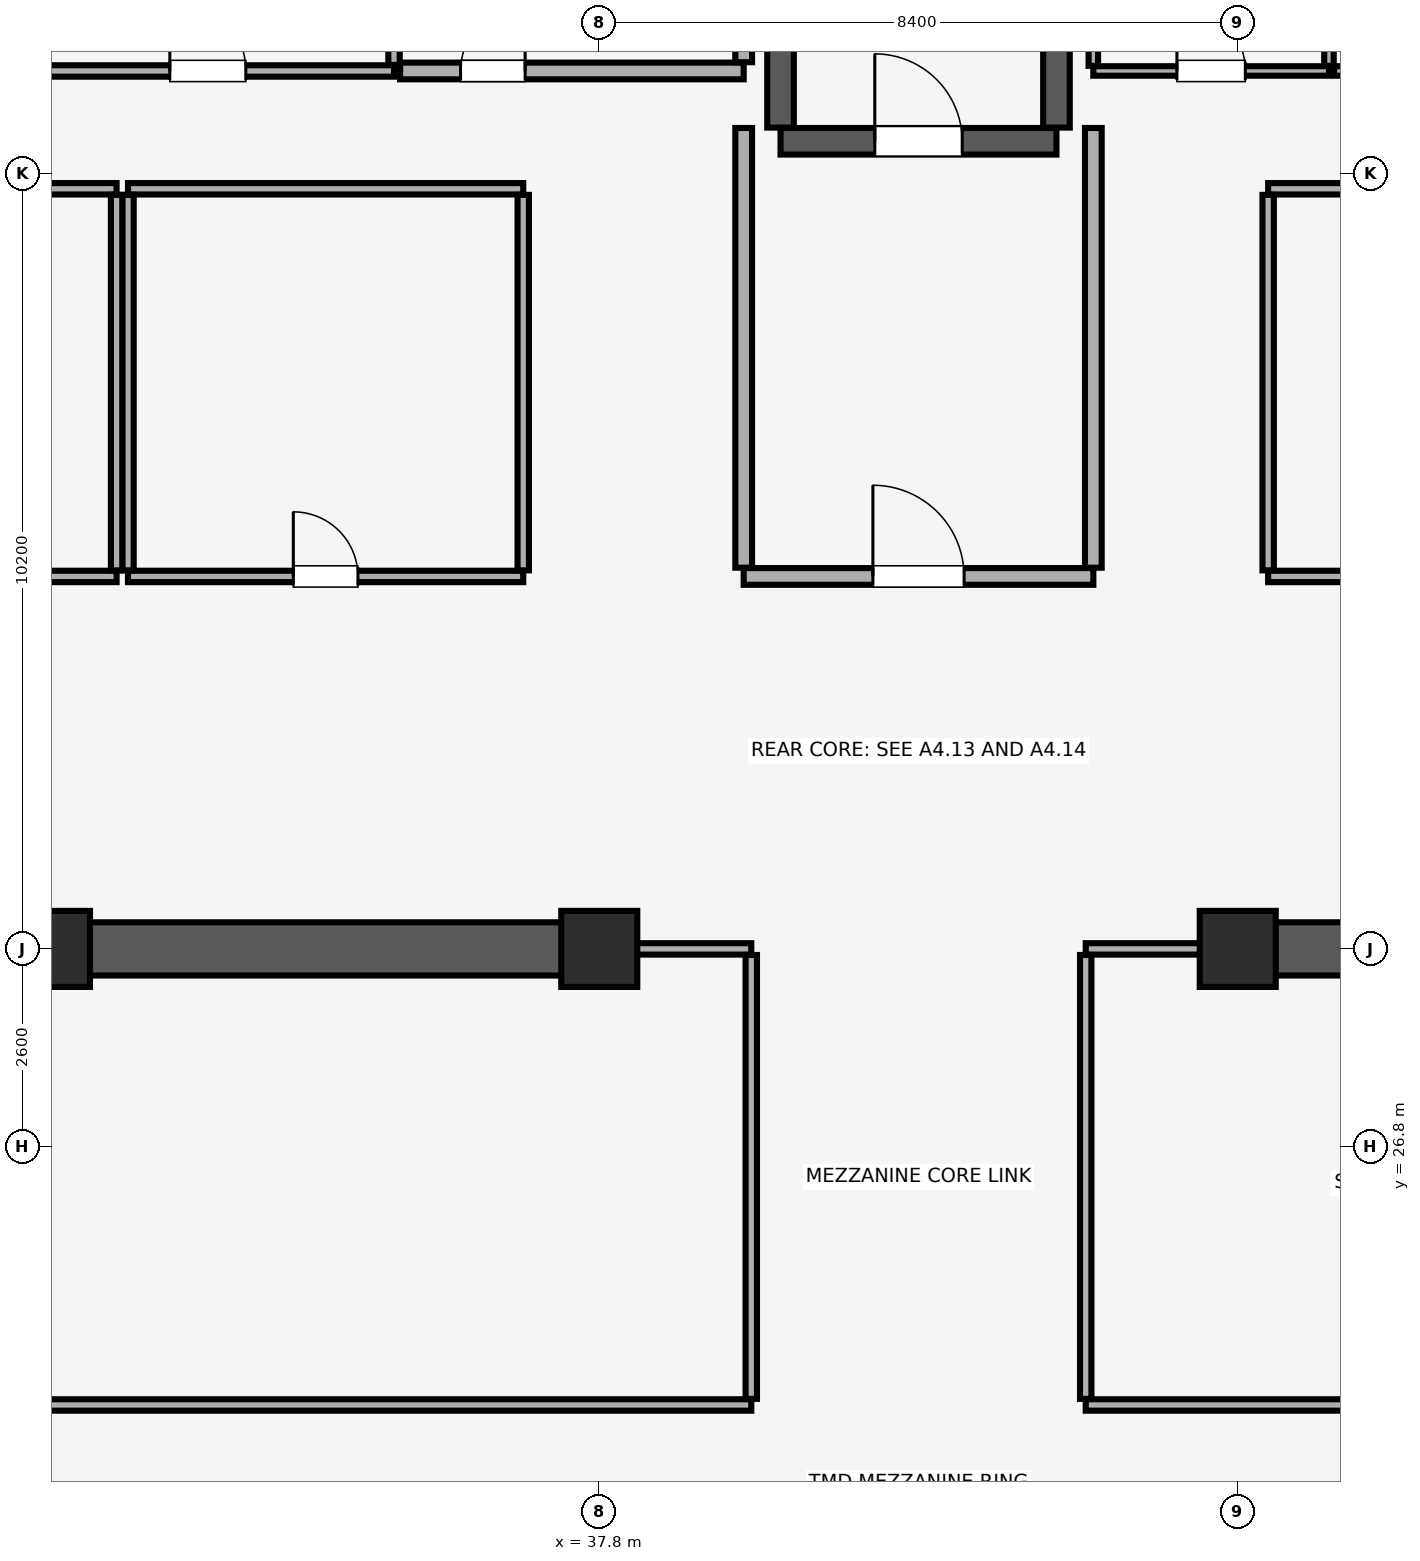
"""IFC4 building model, lengths in metres.
Left out: names, types, materials, properties, quantities, classifications, styles, units other than length and angle.
Written with IfcOpenShell. Run it as: python <this file> out.ifc"""

import sys

from ifc_helpers import new_model, si_unit, direction, frame, frame_2d, origin, origin_2d, place, context, subcontext, project, spatial, rectangle, extrude, element, fill, save


model = new_model("IFC4")
c1 = context("Model", 3, precision=1e-05, world=origin(), true_north=direction((0.0, 1.0)))
c2 = subcontext(c1, "Body", "Model", "MODEL_VIEW")
j1 = project(units=[si_unit("LENGTHUNIT", "METRE"), si_unit("PLANEANGLEUNIT", "RADIAN")], contexts=[c1])
p1 = place(None, origin())
s1 = spatial("IfcSite", under=j1, at=p1, CompositionType="ELEMENT")
p2 = place(p1, origin())
s2 = spatial("IfcBuilding", under=s1, at=p2, CompositionType="ELEMENT")
p3 = place(p2, frame((0.0, 0.0, 300.2)))
s3 = spatial("IfcBuildingStorey", under=s2, at=p3, CompositionType="ELEMENT", Elevation=300.2)
for number, where, z_axis, x_axis in (
    (1, (30.6, 29.4, 0.0), (0.0, 0.0, 1.0), (1.0, 0.0, 0.0)),
    (2, (37.8, 29.4, 0.0), (0.0, 0.0, 1.0), (1.0, 0.0, 0.0)),
    (3, (46.2, 29.4, 0.0), (0.0, 0.0, 1.0), (1.0, 0.0, 0.0)),
):
    element("IfcColumn", number, at=place(p3, frame(where, z_axis=z_axis, x_axis=x_axis)), inside=s3, PredefinedType="COLUMN", context=c2, shape_type="SweptSolid", body=[
        extrude(rectangle(XDim=1.0, YDim=1.0, at=origin_2d()), origin(), (0.0, 0.0, 1.0), 5.12),
    ])
for number, where, z_axis, x_axis in (
    (4, (30.4, 29.4, 0.0), (0.0, 0.0, 1.0), (1.0, 0.0, 0.0)),
    (5, (46.0, 29.4, 0.0), (0.0, 0.0, 1.0), (1.0, 0.0, 0.0)),
):
    element("IfcWall", number, at=place(p3, frame(where, z_axis=z_axis, x_axis=x_axis)), inside=s3, PredefinedType="SHEAR", context=c2, shape_type="SweptSolid", body=[
        extrude(rectangle(XDim=7.6, YDim=0.7, at=frame_2d((3.8, 0.0))), origin(), (0.0, 0.0, 1.0), 5.12),
    ])
p4 = place(p3, frame((40.185, 40.025, 0.0), z_axis=(0.0, 0.0, 1.0), x_axis=(1.0, 0.0, 0.0)))
e6 = element("IfcWall", 6, at=p4, inside=s3, PredefinedType="SHEAR", context=c2, shape_type="SweptSolid", body=[
    extrude(rectangle(XDim=3.63, YDim=0.35, at=frame_2d((1.815, 0.0))), origin(), (0.0, 0.0, 1.0), 5.12),
])
p5 = place(p4, frame((1.24, 0.0, 0.0)))
e7 = element("IfcOpeningElement", 7, at=p5, cuts=e6, PredefinedType="OPENING", context=c2, shape_type="SweptSolid", body=[
    extrude(rectangle(XDim=1.15, YDim=2.15, at=frame_2d((0.575, 1.075))), frame((0.0, 0.185, 0.0), z_axis=(0.0, -1.0, 0.0), x_axis=(1.0, 0.0, 0.0)), (0.0, 0.0, 1.0), 0.37),
])
for number, where, z_axis, x_axis in (
    (8, (40.185, 40.205, 0.0), (0.0, 0.0, 1.0), (0.0, 1.0, 0.0)),
    (9, (43.815, 40.205, 0.0), (0.0, 0.0, 1.0), (0.0, 1.0, 0.0)),
):
    element("IfcWall", number, at=place(p3, frame(where, z_axis=z_axis, x_axis=x_axis)), inside=s3, PredefinedType="SHEAR", context=c2, shape_type="SweptSolid", body=[
        extrude(rectangle(XDim=8.09, YDim=0.35, at=frame_2d((4.045, 0.0))), origin(), (0.0, 0.0, 1.0), 5.12),
    ])
p6 = place(p3, frame((39.7, 34.3, 0.0), z_axis=(0.0, 0.0, 1.0), x_axis=(1.0, 0.0, 0.0)))
e10 = element("IfcWall", 10, at=p6, inside=s3, PredefinedType="PARTITIONING", context=c2, shape_type="SweptSolid", body=[
    extrude(rectangle(XDim=4.6, YDim=0.22, at=frame_2d((2.3, 0.0))), origin(), (0.0, 0.0, 1.0), 5.12),
])
p7 = place(p6, frame((1.7, 0.0, 0.0)))
e11 = element("IfcOpeningElement", 11, at=p7, cuts=e10, PredefinedType="OPENING", context=c2, shape_type="SweptSolid", body=[
    extrude(rectangle(XDim=1.2, YDim=2.15, at=frame_2d((0.6, 1.075))), frame((0.0, 0.12, 0.0), z_axis=(0.0, -1.0, 0.0), x_axis=(1.0, 0.0, 0.0)), (0.0, 0.0, 1.0), 0.24),
])
for number, where, z_axis, x_axis in (
    (12, (39.7, 34.415, 0.0), (0.0, 0.0, 1.0), (0.0, 1.0, 0.0)),
    (13, (44.3, 34.415, 0.0), (0.0, 0.0, 1.0), (0.0, 1.0, 0.0)),
):
    element("IfcWall", number, at=place(p3, frame(where, z_axis=z_axis, x_axis=x_axis)), inside=s3, PredefinedType="PARTITIONING", context=c2, shape_type="SweptSolid", body=[
        extrude(rectangle(XDim=5.785, YDim=0.22, at=frame_2d((2.893, 0.0))), origin(), (0.0, 0.0, 1.0), 5.12),
    ])
p8 = place(p3, frame((31.6, 34.3, 0.0), z_axis=(0.0, 0.0, 1.0), x_axis=(1.0, 0.0, 0.0)))
e14 = element("IfcWall", 14, at=p8, inside=s3, PredefinedType="PARTITIONING", context=c2, shape_type="SweptSolid", body=[
    extrude(rectangle(XDim=5.2, YDim=0.15, at=frame_2d((2.6, 0.0))), origin(), (0.0, 0.0, 1.0), 5.12),
])
p9 = place(p8, frame((2.175, 0.0, 0.0)))
e15 = element("IfcOpeningElement", 15, at=p9, cuts=e14, PredefinedType="OPENING", context=c2, shape_type="SweptSolid", body=[
    extrude(rectangle(XDim=0.85, YDim=2.1, at=frame_2d((0.425, 1.05))), frame((0.0, 0.085, 0.0), z_axis=(0.0, -1.0, 0.0), x_axis=(1.0, 0.0, 0.0)), (0.0, 0.0, 1.0), 0.17),
])
p10 = place(p3, frame((31.6, 39.4, 0.0), z_axis=(0.0, 0.0, 1.0), x_axis=(1.0, 0.0, 0.0)))
e16 = element("IfcWall", 16, at=p10, inside=s3, PredefinedType="PARTITIONING", context=c2, shape_type="SweptSolid", body=[
    extrude(rectangle(XDim=5.2, YDim=0.15, at=frame_2d((2.6, 0.0))), origin(), (0.0, 0.0, 1.0), 5.12),
])
for number, where, z_axis, x_axis in (
    (17, (31.6, 34.38, 0.0), (0.0, 0.0, 1.0), (0.0, 1.0, 0.0)),
    (18, (36.8, 34.38, 0.0), (0.0, 0.0, 1.0), (0.0, 1.0, 0.0)),
):
    element("IfcWall", number, at=place(p3, frame(where, z_axis=z_axis, x_axis=x_axis)), inside=s3, PredefinedType="PARTITIONING", context=c2, shape_type="SweptSolid", body=[
        extrude(rectangle(XDim=4.94, YDim=0.15, at=frame_2d((2.47, 0.0))), origin(), (0.0, 0.0, 1.0), 5.12),
    ])
p11 = place(p3, frame((23.8, 34.3, 0.0), z_axis=(0.0, 0.0, 1.0), x_axis=(1.0, 0.0, 0.0)))
e19 = element("IfcWall", 19, at=p11, inside=s3, PredefinedType="PARTITIONING", context=c2, shape_type="SweptSolid", body=[
    extrude(rectangle(XDim=7.65, YDim=0.15, at=frame_2d((3.825, 0.0))), origin(), (0.0, 0.0, 1.0), 5.12),
])
p12 = place(p11, frame((3.3, 0.0, 0.0)))
e20 = element("IfcOpeningElement", 20, at=p12, cuts=e19, PredefinedType="OPENING", context=c2, shape_type="SweptSolid", body=[
    extrude(rectangle(XDim=1.0, YDim=2.15, at=frame_2d((0.5, 1.075))), frame((0.0, 0.085, 0.0), z_axis=(0.0, -1.0, 0.0), x_axis=(1.0, 0.0, 0.0)), (0.0, 0.0, 1.0), 0.17),
])
p13 = place(p3, frame((23.8, 39.4, 0.0), z_axis=(0.0, 0.0, 1.0), x_axis=(1.0, 0.0, 0.0)))
e21 = element("IfcWall", 21, at=p13, inside=s3, PredefinedType="PARTITIONING", context=c2, shape_type="SweptSolid", body=[
    extrude(rectangle(XDim=7.65, YDim=0.15, at=frame_2d((3.825, 0.0))), origin(), (0.0, 0.0, 1.0), 5.12),
])
p14 = place(p3, frame((31.45, 34.38, 0.0), z_axis=(0.0, 0.0, 1.0), x_axis=(0.0, 1.0, 0.0)))
e22 = element("IfcWall", 22, at=p14, inside=s3, PredefinedType="PARTITIONING", context=c2, shape_type="SweptSolid", body=[
    extrude(rectangle(XDim=4.94, YDim=0.15, at=frame_2d((2.47, 0.0))), origin(), (0.0, 0.0, 1.0), 5.12),
])
p15 = place(p3, frame((46.6, 34.3, 0.0), z_axis=(0.0, 0.0, 1.0), x_axis=(1.0, 0.0, 0.0)))
e23 = element("IfcWall", 23, at=p15, inside=s3, PredefinedType="PARTITIONING", context=c2, shape_type="SweptSolid", body=[
    extrude(rectangle(XDim=7.95, YDim=0.15, at=frame_2d((3.975, 0.0))), origin(), (0.0, 0.0, 1.0), 5.12),
])
p16 = place(p15, frame((3.4, 0.0, 0.0)))
e24 = element("IfcOpeningElement", 24, at=p16, cuts=e23, PredefinedType="OPENING", context=c2, shape_type="SweptSolid", body=[
    extrude(rectangle(XDim=1.0, YDim=2.15, at=frame_2d((0.5, 1.075))), frame((0.0, 0.085, 0.0), z_axis=(0.0, -1.0, 0.0), x_axis=(1.0, 0.0, 0.0)), (0.0, 0.0, 1.0), 0.17),
])
p17 = place(p3, frame((46.6, 39.4, 0.0), z_axis=(0.0, 0.0, 1.0), x_axis=(1.0, 0.0, 0.0)))
e25 = element("IfcWall", 25, at=p17, inside=s3, PredefinedType="PARTITIONING", context=c2, shape_type="SweptSolid", body=[
    extrude(rectangle(XDim=7.95, YDim=0.15, at=frame_2d((3.975, 0.0))), origin(), (0.0, 0.0, 1.0), 5.12),
])
p18 = place(p3, frame((46.6, 34.38, 0.0), z_axis=(0.0, 0.0, 1.0), x_axis=(0.0, 1.0, 0.0)))
e26 = element("IfcWall", 26, at=p18, inside=s3, PredefinedType="PARTITIONING", context=c2, shape_type="SweptSolid", body=[
    extrude(rectangle(XDim=4.94, YDim=0.15, at=frame_2d((2.47, 0.0))), origin(), (0.0, 0.0, 1.0), 5.12),
])
p19 = place(p3, frame((30.28, 40.95, 0.0), z_axis=(0.0, 0.0, 1.0), x_axis=(1.0, 0.0, 0.0)))
e27 = element("IfcWall", 27, at=p19, inside=s3, PredefinedType="PARTITIONING", context=c2, shape_type="SweptSolid", body=[
    extrude(rectangle(XDim=4.82, YDim=0.15, at=frame_2d((2.41, 0.0))), origin(), (0.0, 0.0, 1.0), 5.12),
])
p20 = place(p19, frame((1.87, 0.0, 0.0)))
e28 = element("IfcOpeningElement", 28, at=p20, cuts=e27, PredefinedType="OPENING", context=c2, shape_type="SweptSolid", body=[
    extrude(rectangle(XDim=1.0, YDim=2.15, at=frame_2d((0.5, 1.075))), frame((0.0, 0.085, 0.0), z_axis=(0.0, -1.0, 0.0), x_axis=(1.0, 0.0, 0.0)), (0.0, 0.0, 1.0), 0.17),
])
p21 = place(p3, frame((35.1, 41.03, 0.0), z_axis=(0.0, 0.0, 1.0), x_axis=(0.0, 1.0, 0.0)))
e29 = element("IfcWall", 29, at=p21, inside=s3, PredefinedType="PARTITIONING", context=c2, shape_type="SweptSolid", body=[
    extrude(rectangle(XDim=7.82, YDim=0.15, at=frame_2d((3.91, 0.0))), origin(), (0.0, 0.0, 1.0), 5.12),
])
p22 = place(p3, frame((35.18, 40.95, 0.0), z_axis=(0.0, 0.0, 1.0), x_axis=(1.0, 0.0, 0.0)))
e30 = element("IfcWall", 30, at=p22, inside=s3, PredefinedType="PARTITIONING", context=c2, shape_type="SweptSolid", body=[
    extrude(rectangle(XDim=4.52, YDim=0.22, at=frame_2d((2.26, 0.0))), origin(), (0.0, 0.0, 1.0), 5.12),
])
p23 = place(p22, frame((0.795, 0.0, 0.0)))
e31 = element("IfcOpeningElement", 31, at=p23, cuts=e30, PredefinedType="OPENING", context=c2, shape_type="SweptSolid", body=[
    extrude(rectangle(XDim=0.85, YDim=2.1, at=frame_2d((0.425, 1.05))), frame((0.0, 0.12, 0.0), z_axis=(0.0, -1.0, 0.0), x_axis=(1.0, 0.0, 0.0)), (0.0, 0.0, 1.0), 0.24),
])
p24 = place(p3, frame((39.7, 41.065, 0.0), z_axis=(0.0, 0.0, 1.0), x_axis=(0.0, 1.0, 0.0)))
e32 = element("IfcWall", 32, at=p24, inside=s3, PredefinedType="PARTITIONING", context=c2, shape_type="SweptSolid", body=[
    extrude(rectangle(XDim=7.785, YDim=0.22, at=frame_2d((3.893, 0.0))), origin(), (0.0, 0.0, 1.0), 5.12),
])
p25 = place(p3, frame((44.3, 40.95, 0.0), z_axis=(0.0, 0.0, 1.0), x_axis=(1.0, 0.0, 0.0)))
e33 = element("IfcWall", 33, at=p25, inside=s3, PredefinedType="PARTITIONING", context=c2, shape_type="SweptSolid", body=[
    extrude(rectangle(XDim=3.1, YDim=0.125, at=frame_2d((1.55, 0.0))), origin(), (0.0, 0.0, 1.0), 5.12),
])
p26 = place(p25, frame((1.1, 0.0, 0.0)))
e34 = element("IfcOpeningElement", 34, at=p26, cuts=e33, PredefinedType="OPENING", context=c2, shape_type="SweptSolid", body=[
    extrude(rectangle(XDim=0.9, YDim=2.1, at=frame_2d((0.45, 1.05))), frame((0.0, 0.073, 0.0), z_axis=(0.0, -1.0, 0.0), x_axis=(1.0, 0.0, 0.0)), (0.0, 0.0, 1.0), 0.145),
])
for number, where, z_axis, x_axis in (
    (35, (44.3, 41.018, 0.0), (0.0, 0.0, 1.0), (0.0, 1.0, 0.0)),
    (36, (47.4, 41.018, 0.0), (0.0, 0.0, 1.0), (0.0, 1.0, 0.0)),
):
    element("IfcWall", number, at=place(p3, frame(where, z_axis=z_axis, x_axis=x_axis)), inside=s3, PredefinedType="PARTITIONING", context=c2, shape_type="SweptSolid", body=[
        extrude(rectangle(XDim=7.833, YDim=0.125, at=frame_2d((3.916, 0.0))), origin(), (0.0, 0.0, 1.0), 5.12),
    ])
p27 = place(p3, frame((47.468, 40.95, 0.0), z_axis=(0.0, 0.0, 1.0), x_axis=(1.0, 0.0, 0.0)))
e37 = element("IfcWall", 37, at=p27, inside=s3, PredefinedType="PARTITIONING", context=c2, shape_type="SweptSolid", body=[
    extrude(rectangle(XDim=4.932, YDim=0.125, at=frame_2d((2.466, 0.0))), origin(), (0.0, 0.0, 1.0), 5.12),
])
p28 = place(p27, frame((1.982, 0.0, 0.0)))
e38 = element("IfcOpeningElement", 38, at=p28, cuts=e37, PredefinedType="OPENING", context=c2, shape_type="SweptSolid", body=[
    extrude(rectangle(XDim=0.9, YDim=2.1, at=frame_2d((0.45, 1.05))), frame((0.0, 0.073, 0.0), z_axis=(0.0, -1.0, 0.0), x_axis=(1.0, 0.0, 0.0)), (0.0, 0.0, 1.0), 0.145),
])
p29 = place(p3, frame((16.0, 23.4, 0.0), z_axis=(0.0, 0.0, 1.0), x_axis=(1.0, 0.0, 0.0)))
e39 = element("IfcWall", 39, at=p29, inside=s3, PredefinedType="PARTITIONING", context=c2, shape_type="SweptSolid", body=[
    extrude(rectangle(XDim=23.8, YDim=0.15, at=frame_2d((11.9, 0.0))), origin(), (0.0, 0.0, 1.0), 5.12),
])
p30 = place(p29, frame((10.5, 0.0, 0.0)))
e40 = element("IfcOpeningElement", 40, at=p30, cuts=e39, PredefinedType="OPENING", context=c2, shape_type="SweptSolid", body=[
    extrude(rectangle(XDim=1.0, YDim=2.15, at=frame_2d((0.5, 1.075))), frame((0.0, 0.085, 0.0), z_axis=(0.0, -1.0, 0.0), x_axis=(1.0, 0.0, 0.0)), (0.0, 0.0, 1.0), 0.17),
])
p31 = place(p3, frame((38.01, 29.4, 0.0), z_axis=(0.0, 0.0, 1.0), x_axis=(1.0, 0.0, 0.0)))
e41 = element("IfcWall", 41, at=p31, inside=s3, PredefinedType="PARTITIONING", context=c2, shape_type="SweptSolid", body=[
    extrude(rectangle(XDim=1.79, YDim=0.15, at=frame_2d((0.895, 0.0))), origin(), (0.0, 0.0, 1.0), 4.02),
])
p32 = place(p3, frame((39.8, 23.48, 0.0), z_axis=(0.0, 0.0, 1.0), x_axis=(0.0, 1.0, 0.0)))
e42 = element("IfcWall", 42, at=p32, inside=s3, PredefinedType="PARTITIONING", context=c2, shape_type="SweptSolid", body=[
    extrude(rectangle(XDim=5.84, YDim=0.15, at=frame_2d((2.92, 0.0))), origin(), (0.0, 0.0, 1.0), 5.12),
])
p33 = place(p3, frame((44.2, 23.4, 0.0), z_axis=(0.0, 0.0, 1.0), x_axis=(1.0, 0.0, 0.0)))
e43 = element("IfcWall", 43, at=p33, inside=s3, PredefinedType="PARTITIONING", context=c2, shape_type="SweptSolid", body=[
    extrude(rectangle(XDim=23.8, YDim=0.15, at=frame_2d((11.9, 0.0))), origin(), (0.0, 0.0, 1.0), 5.12),
])
p34 = place(p33, frame((12.3, 0.0, 0.0)))
e44 = element("IfcOpeningElement", 44, at=p34, cuts=e43, PredefinedType="OPENING", context=c2, shape_type="SweptSolid", body=[
    extrude(rectangle(XDim=1.0, YDim=2.15, at=frame_2d((0.5, 1.075))), frame((0.0, 0.085, 0.0), z_axis=(0.0, -1.0, 0.0), x_axis=(1.0, 0.0, 0.0)), (0.0, 0.0, 1.0), 0.17),
])
p35 = place(p3, frame((44.2, 29.4, 0.0), z_axis=(0.0, 0.0, 1.0), x_axis=(1.0, 0.0, 0.0)))
e45 = element("IfcWall", 45, at=p35, inside=s3, PredefinedType="PARTITIONING", context=c2, shape_type="SweptSolid", body=[
    extrude(rectangle(XDim=1.79, YDim=0.15, at=frame_2d((0.895, 0.0))), origin(), (0.0, 0.0, 1.0), 4.02),
])
p36 = place(p3, frame((44.2, 23.48, 0.0), z_axis=(0.0, 0.0, 1.0), x_axis=(0.0, 1.0, 0.0)))
e46 = element("IfcWall", 46, at=p36, inside=s3, PredefinedType="PARTITIONING", context=c2, shape_type="SweptSolid", body=[
    extrude(rectangle(XDim=5.84, YDim=0.15, at=frame_2d((2.92, 0.0))), origin(), (0.0, 0.0, 1.0), 5.12),
])
p37 = place(p5, origin())
e47 = element("IfcDoor", 47, at=p37, inside=s3, OperationType="SINGLE_SWING_LEFT", PredefinedType="DOOR", context=c2, shape_type="SweptSolid", body=[
    extrude(rectangle(XDim=1.15, YDim=2.15, at=frame_2d((0.575, 1.075))), frame((0.0, 0.025, 0.0), z_axis=(0.0, -1.0, 0.0), x_axis=(1.0, 0.0, 0.0)), (0.0, 0.0, 1.0), 0.05),
])
fill(e7, e47)
p38 = place(p7, origin())
e48 = element("IfcDoor", 48, at=p38, inside=s3, OperationType="SINGLE_SWING_LEFT", PredefinedType="DOOR", context=c2, shape_type="SweptSolid", body=[
    extrude(rectangle(XDim=1.2, YDim=2.15, at=frame_2d((0.6, 1.075))), frame((0.0, 0.025, 0.0), z_axis=(0.0, -1.0, 0.0), x_axis=(1.0, 0.0, 0.0)), (0.0, 0.0, 1.0), 0.05),
])
fill(e11, e48)
p39 = place(p9, origin())
e49 = element("IfcDoor", 49, at=p39, inside=s3, OperationType="SINGLE_SWING_LEFT", PredefinedType="DOOR", context=c2, shape_type="SweptSolid", body=[
    extrude(rectangle(XDim=0.85, YDim=2.1, at=frame_2d((0.425, 1.05))), frame((0.0, 0.025, 0.0), z_axis=(0.0, -1.0, 0.0), x_axis=(1.0, 0.0, 0.0)), (0.0, 0.0, 1.0), 0.05),
])
fill(e15, e49)
p40 = place(p20, origin())
e50 = element("IfcDoor", 50, at=p40, inside=s3, OperationType="SINGLE_SWING_LEFT", PredefinedType="DOOR", context=c2, shape_type="SweptSolid", body=[
    extrude(rectangle(XDim=1.0, YDim=2.15, at=frame_2d((0.5, 1.075))), frame((0.0, 0.025, 0.0), z_axis=(0.0, -1.0, 0.0), x_axis=(1.0, 0.0, 0.0)), (0.0, 0.0, 1.0), 0.05),
])
fill(e28, e50)
p41 = place(p23, origin())
e51 = element("IfcDoor", 51, at=p41, inside=s3, OperationType="SINGLE_SWING_RIGHT", PredefinedType="DOOR", context=c2, shape_type="SweptSolid", body=[
    extrude(rectangle(XDim=0.85, YDim=2.1, at=frame_2d((0.425, 1.05))), frame((0.0, 0.025, 0.0), z_axis=(0.0, -1.0, 0.0), x_axis=(1.0, 0.0, 0.0)), (0.0, 0.0, 1.0), 0.05),
])
fill(e31, e51)
p42 = place(p26, origin())
e52 = element("IfcDoor", 52, at=p42, inside=s3, OperationType="SINGLE_SWING_LEFT", PredefinedType="DOOR", context=c2, shape_type="SweptSolid", body=[
    extrude(rectangle(XDim=0.9, YDim=2.1, at=frame_2d((0.45, 1.05))), frame((0.0, 0.025, 0.0), z_axis=(0.0, -1.0, 0.0), x_axis=(1.0, 0.0, 0.0)), (0.0, 0.0, 1.0), 0.05),
])
fill(e34, e52)
save(model, sys.argv[1])
